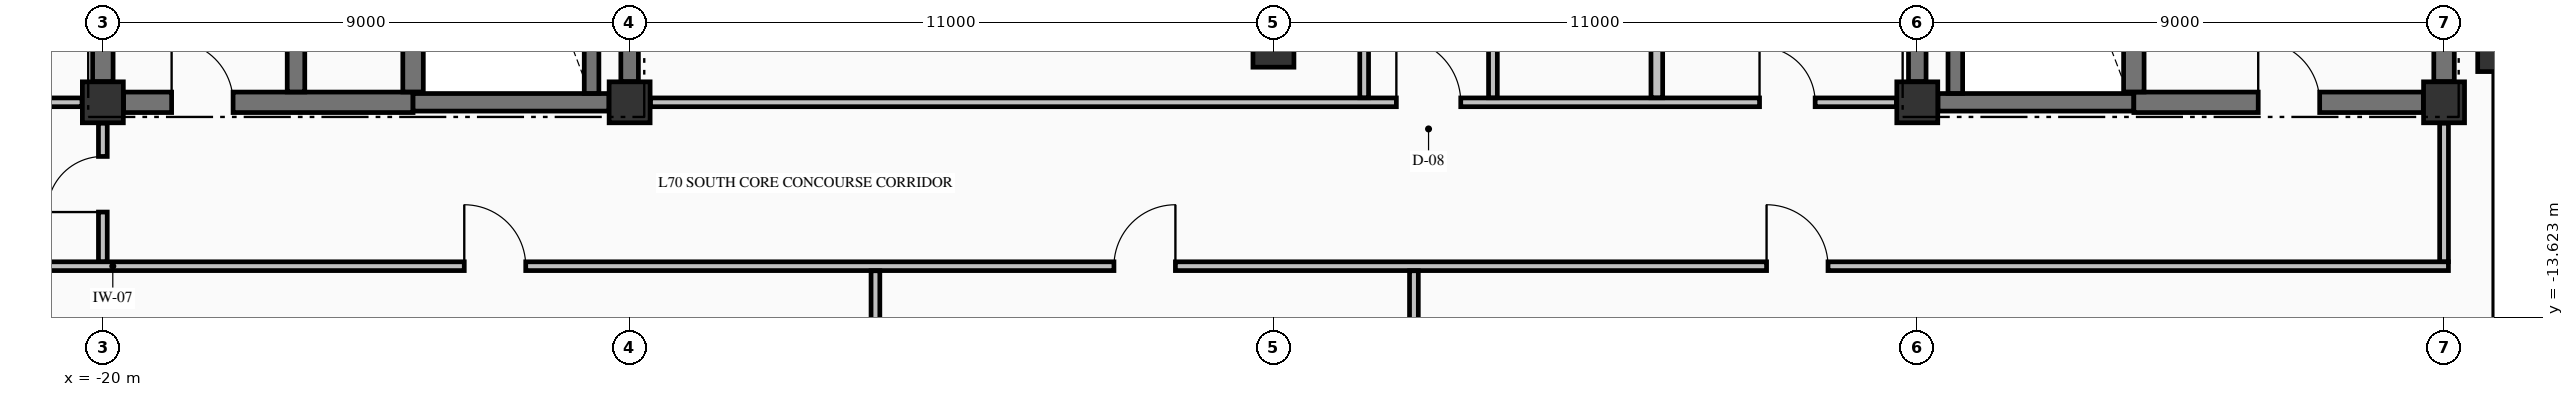
"""IFC4 building model, lengths in metres.
Left out: names, types, materials, properties, quantities, classifications, styles, units other than length and angle.
Written with IfcOpenShell. Run it as: python <this file> out.ifc"""

import sys

from ifc_helpers import new_model, si_unit, direction, frame, frame_2d, origin, origin_2d, place, context, subcontext, project, spatial, rectangle, extrude, element, fill, save


model = new_model("IFC4")
c1 = context("Model", 3, precision=1e-05, world=origin(), true_north=direction((0.0, 1.0)))
c2 = subcontext(c1, "Body", "Model", "MODEL_VIEW")
j1 = project(units=[si_unit("LENGTHUNIT", "METRE"), si_unit("PLANEANGLEUNIT", "RADIAN")], contexts=[c1])
p1 = place(None, origin())
s1 = spatial("IfcSite", under=j1, at=p1, CompositionType="ELEMENT")
p2 = place(p1, origin())
s2 = spatial("IfcBuilding", under=s1, at=p2, CompositionType="ELEMENT")
p3 = place(p2, frame((0.0, 0.0, 264.12)))
s3 = spatial("IfcBuildingStorey", under=s2, at=p3, CompositionType="ELEMENT", Elevation=264.12)
p4 = place(p3, frame((21.0, -9.0, -0.25), z_axis=(0.0, 0.0, 1.0), x_axis=(1.0, 0.0, 0.0)))
e1 = element("IfcColumn", 1, at=p4, inside=s3, PredefinedType="COLUMN", context=c2, shape_type="SweptSolid", body=[
    extrude(rectangle(XDim=0.85, YDim=0.85, at=origin_2d()), origin(), (0.0, 0.0, 1.0), 3.23),
])
for number, where, z_axis, x_axis in (
    (2, (-20.0, -9.95, -0.25), (0.0, 0.0, 1.0), (1.0, 0.0, 0.0)),
    (3, (-11.0, -9.95, -0.25), (0.0, 0.0, 1.0), (1.0, 0.0, 0.0)),
    (4, (11.0, -9.95, -0.25), (0.0, 0.0, 1.0), (1.0, 0.0, 0.0)),
    (5, (20.0, -9.95, -0.25), (0.0, 0.0, 1.0), (1.0, 0.0, 0.0)),
    (6, (0.0, -9.0, -0.25), (0.0, 0.0, 1.0), (1.0, 0.0, 0.0)),
):
    element("IfcColumn", number, at=place(p3, frame(where, z_axis=z_axis, x_axis=x_axis)), inside=s3, PredefinedType="COLUMN", context=c2, shape_type="SweptSolid", body=[
        extrude(rectangle(XDim=0.7, YDim=0.7, at=origin_2d()), origin(), (0.0, 0.0, 1.0), 3.23),
    ])
p5 = place(p3, frame((21.0, -17.545, 0.0), z_axis=(0.0, 0.0, 1.0), x_axis=(0.0, 1.0, 0.0)))
e7 = element("IfcWall", 7, at=p5, inside=s3, PredefinedType="STANDARD", context=c2, shape_type="SweptSolid", body=[
    extrude(rectangle(XDim=8.09, YDim=0.3, at=frame_2d((4.045, 0.0))), origin(), (0.0, 0.0, 1.0), 2.372),
])
p6 = place(p3, frame((-19.646, -9.95, 0.0), z_axis=(0.0, 0.0, 1.0), x_axis=(1.0, 0.0, 0.0)))
e8 = element("IfcWall", 8, at=p6, inside=s3, PredefinedType="SHEAR", context=c2, shape_type="SweptSolid", body=[
    extrude(rectangle(XDim=4.946, YDim=0.35, at=frame_2d((2.473, 0.0))), origin(), (0.0, 0.0, 1.0), 2.98),
])
p7 = place(p6, frame((0.821, 0.0, 0.0)))
e9 = element("IfcOpeningElement", 9, at=p7, cuts=e8, PredefinedType="OPENING", context=c2, shape_type="SweptSolid", body=[
    extrude(rectangle(XDim=1.05, YDim=2.15, at=frame_2d((0.525, 1.075))), frame((0.0, 0.185, 0.0), z_axis=(0.0, -1.0, 0.0), x_axis=(1.0, 0.0, 0.0)), (0.0, 0.0, 1.0), 0.37),
])
for number, where, z_axis, x_axis in (
    (10, (-14.7, -9.95, 0.0), (0.0, 0.0, 1.0), (1.0, 0.0, 0.0)),
    (11, (11.354, -9.95, 0.0), (0.0, 0.0, 1.0), (1.0, 0.0, 0.0)),
):
    element("IfcWall", number, at=place(p3, frame(where, z_axis=z_axis, x_axis=x_axis)), inside=s3, PredefinedType="SHEAR", context=c2, shape_type="SweptSolid", body=[
        extrude(rectangle(XDim=3.346, YDim=0.3, at=frame_2d((1.673, 0.0))), origin(), (0.0, 0.0, 1.0), 2.98),
    ])
p8 = place(p3, frame((14.7, -9.95, 0.0), z_axis=(0.0, 0.0, 1.0), x_axis=(1.0, 0.0, 0.0)))
e12 = element("IfcWall", 12, at=p8, inside=s3, PredefinedType="SHEAR", context=c2, shape_type="SweptSolid", body=[
    extrude(rectangle(XDim=4.946, YDim=0.35, at=frame_2d((2.473, 0.0))), origin(), (0.0, 0.0, 1.0), 2.98),
])
p9 = place(p8, frame((2.125, 0.0, 0.0)))
e13 = element("IfcOpeningElement", 13, at=p9, cuts=e12, PredefinedType="OPENING", context=c2, shape_type="SweptSolid", body=[
    extrude(rectangle(XDim=1.05, YDim=2.15, at=frame_2d((0.525, 1.075))), frame((0.0, 0.185, 0.0), z_axis=(0.0, -1.0, 0.0), x_axis=(1.0, 0.0, 0.0)), (0.0, 0.0, 1.0), 0.37),
])
p10 = place(p3, frame((-25.835, -12.75, 0.0), z_axis=(0.0, 0.0, 1.0), x_axis=(1.0, 0.0, 0.0)))
e14 = element("IfcWall", 14, at=p10, inside=s3, PredefinedType="PARTITIONING", context=c2, shape_type="SweptSolid", body=[
    extrude(rectangle(XDim=45.91, YDim=0.15, at=frame_2d((22.955, 0.0))), origin(), (0.0, 0.0, 1.0), 2.98),
])
p11 = place(p10, frame((12.01, 0.0, 0.0)))
e15 = element("IfcOpeningElement", 15, at=p11, cuts=e14, PredefinedType="OPENING", context=c2, shape_type="SweptSolid", body=[
    extrude(rectangle(XDim=1.05, YDim=2.15, at=frame_2d((0.525, 1.075))), frame((0.0, 0.085, 0.0), z_axis=(0.0, -1.0, 0.0), x_axis=(1.0, 0.0, 0.0)), (0.0, 0.0, 1.0), 0.17),
])
p12 = place(p10, frame((23.11, 0.0, 0.0)))
e16 = element("IfcOpeningElement", 16, at=p12, cuts=e14, PredefinedType="OPENING", context=c2, shape_type="SweptSolid", body=[
    extrude(rectangle(XDim=1.05, YDim=2.15, at=frame_2d((0.525, 1.075))), frame((0.0, 0.085, 0.0), z_axis=(0.0, -1.0, 0.0), x_axis=(1.0, 0.0, 0.0)), (0.0, 0.0, 1.0), 0.17),
])
p13 = place(p10, frame((34.26, 0.0, 0.0)))
e17 = element("IfcOpeningElement", 17, at=p13, cuts=e14, PredefinedType="OPENING", context=c2, shape_type="SweptSolid", body=[
    extrude(rectangle(XDim=1.05, YDim=2.15, at=frame_2d((0.525, 1.075))), frame((0.0, 0.085, 0.0), z_axis=(0.0, -1.0, 0.0), x_axis=(1.0, 0.0, 0.0)), (0.0, 0.0, 1.0), 0.17),
])
p14 = place(p3, frame((-25.835, -9.95, 0.0), z_axis=(0.0, 0.0, 1.0), x_axis=(1.0, 0.0, 0.0)))
e18 = element("IfcWall", 18, at=p14, inside=s3, PredefinedType="PARTITIONING", context=c2, shape_type="SweptSolid", body=[
    extrude(rectangle(XDim=5.479, YDim=0.15, at=frame_2d((2.74, 0.0))), origin(), (0.0, 0.0, 1.0), 2.98),
])
p15 = place(p14, frame((2.36, 0.0, 0.0)))
e19 = element("IfcOpeningElement", 19, at=p15, cuts=e18, PredefinedType="OPENING", context=c2, shape_type="SweptSolid", body=[
    extrude(rectangle(XDim=0.95, YDim=2.15, at=frame_2d((0.475, 1.075))), frame((0.0, 0.085, 0.0), z_axis=(0.0, -1.0, 0.0), x_axis=(1.0, 0.0, 0.0)), (0.0, 0.0, 1.0), 0.17),
])
p16 = place(p3, frame((-10.644, -9.95, 0.0), z_axis=(0.0, 0.0, 1.0), x_axis=(1.0, 0.0, 0.0)))
e20 = element("IfcWall", 20, at=p16, inside=s3, PredefinedType="PARTITIONING", context=c2, shape_type="SweptSolid", body=[
    extrude(rectangle(XDim=21.288, YDim=0.15, at=frame_2d((10.644, 0.0))), origin(), (0.0, 0.0, 1.0), 2.98),
])
p17 = place(p16, frame((12.744, 0.0, 0.0)))
e21 = element("IfcOpeningElement", 21, at=p17, cuts=e20, PredefinedType="OPENING", context=c2, shape_type="SweptSolid", body=[
    extrude(rectangle(XDim=1.1, YDim=2.15, at=frame_2d((0.55, 1.075))), frame((0.0, 0.085, 0.0), z_axis=(0.0, -1.0, 0.0), x_axis=(1.0, 0.0, 0.0)), (0.0, 0.0, 1.0), 0.17),
])
p18 = place(p16, frame((18.949, 0.0, 0.0)))
e22 = element("IfcOpeningElement", 22, at=p18, cuts=e20, PredefinedType="OPENING", context=c2, shape_type="SweptSolid", body=[
    extrude(rectangle(XDim=0.95, YDim=2.15, at=frame_2d((0.475, 1.075))), frame((0.0, 0.085, 0.0), z_axis=(0.0, -1.0, 0.0), x_axis=(1.0, 0.0, 0.0)), (0.0, 0.0, 1.0), 0.17),
])
p19 = place(p3, frame((-20.0, -9.596, 0.0), z_axis=(0.0, 0.0, 1.0), x_axis=(0.0, 1.0, 0.0)))
e23 = element("IfcWall", 23, at=p19, inside=s3, PredefinedType="SHEAR", context=c2, shape_type="SweptSolid", body=[
    extrude(rectangle(XDim=9.242, YDim=0.35, at=frame_2d((4.621, 0.0))), origin(), (0.0, 0.0, 1.0), 2.98),
])
p20 = place(p3, frame((-16.7, -9.773, 0.0), z_axis=(0.0, 0.0, 1.0), x_axis=(0.0, 1.0, 0.0)))
e24 = element("IfcWall", 24, at=p20, inside=s3, PredefinedType="SHEAR", context=c2, shape_type="SweptSolid", body=[
    extrude(rectangle(XDim=9.371, YDim=0.3, at=frame_2d((4.686, 0.0))), origin(), (0.0, 0.0, 1.0), 2.98),
])
p21 = place(p3, frame((-14.7, -9.773, 0.0), z_axis=(0.0, 0.0, 1.0), x_axis=(0.0, 1.0, 0.0)))
e25 = element("IfcWall", 25, at=p21, inside=s3, PredefinedType="SHEAR", context=c2, shape_type="SweptSolid", body=[
    extrude(rectangle(XDim=9.371, YDim=0.35, at=frame_2d((4.686, 0.0))), origin(), (0.0, 0.0, 1.0), 2.98),
])
p22 = place(p3, frame((-11.65, -9.798, 0.0), z_axis=(0.0, 0.0, 1.0), x_axis=(0.0, 1.0, 0.0)))
e26 = element("IfcWall", 26, at=p22, inside=s3, PredefinedType="SOLIDWALL", context=c2, shape_type="SweptSolid", body=[
    extrude(rectangle(XDim=9.396, YDim=0.25, at=frame_2d((4.698, 0.0))), origin(), (0.0, 0.0, 1.0), 2.98),
])
for number, where, z_axis, x_axis in (
    (27, (-11.0, -9.596, 0.0), (0.0, 0.0, 1.0), (0.0, 1.0, 0.0)),
    (28, (11.0, -9.596, 0.0), (0.0, 0.0, 1.0), (0.0, 1.0, 0.0)),
):
    element("IfcWall", number, at=place(p3, frame(where, z_axis=z_axis, x_axis=x_axis)), inside=s3, PredefinedType="SHEAR", context=c2, shape_type="SweptSolid", body=[
        extrude(rectangle(XDim=9.242, YDim=0.3, at=frame_2d((4.621, 0.0))), origin(), (0.0, 0.0, 1.0), 2.98),
    ])
p23 = place(p3, frame((11.65, -9.798, 0.0), z_axis=(0.0, 0.0, 1.0), x_axis=(0.0, 1.0, 0.0)))
e29 = element("IfcWall", 29, at=p23, inside=s3, PredefinedType="SOLIDWALL", context=c2, shape_type="SweptSolid", body=[
    extrude(rectangle(XDim=9.396, YDim=0.25, at=frame_2d((4.698, 0.0))), origin(), (0.0, 0.0, 1.0), 2.98),
])
p24 = place(p3, frame((14.7, -9.773, 0.0), z_axis=(0.0, 0.0, 1.0), x_axis=(0.0, 1.0, 0.0)))
e30 = element("IfcWall", 30, at=p24, inside=s3, PredefinedType="SHEAR", context=c2, shape_type="SweptSolid", body=[
    extrude(rectangle(XDim=9.371, YDim=0.35, at=frame_2d((4.686, 0.0))), origin(), (0.0, 0.0, 1.0), 2.98),
])
p25 = place(p3, frame((20.0, -9.596, 0.0), z_axis=(0.0, 0.0, 1.0), x_axis=(0.0, 1.0, 0.0)))
e31 = element("IfcWall", 31, at=p25, inside=s3, PredefinedType="SHEAR", context=c2, shape_type="SweptSolid", body=[
    extrude(rectangle(XDim=14.769, YDim=0.35, at=frame_2d((7.385, 0.0))), origin(), (0.0, 0.0, 1.0), 2.98),
])
p26 = place(p3, frame((-20.0, -12.672, 0.0), z_axis=(0.0, 0.0, 1.0), x_axis=(0.0, 1.0, 0.0)))
e32 = element("IfcWall", 32, at=p26, inside=s3, PredefinedType="PARTITIONING", context=c2, shape_type="SweptSolid", body=[
    extrude(rectangle(XDim=2.366, YDim=0.15, at=frame_2d((1.183, 0.0))), origin(), (0.0, 0.0, 1.0), 2.98),
])
p27 = place(p26, frame((0.847, 0.0, 0.0)))
e33 = element("IfcOpeningElement", 33, at=p27, cuts=e32, PredefinedType="OPENING", context=c2, shape_type="SweptSolid", body=[
    extrude(rectangle(XDim=0.95, YDim=2.15, at=frame_2d((0.475, 1.075))), frame((0.0, 0.085, 0.0), z_axis=(0.0, -1.0, 0.0), x_axis=(1.0, 0.0, 0.0)), (0.0, 0.0, 1.0), 0.17),
])
p28 = place(p3, frame((-6.8, -23.335, 0.0), z_axis=(0.0, 0.0, 1.0), x_axis=(0.0, 1.0, 0.0)))
e34 = element("IfcWall", 34, at=p28, inside=s3, PredefinedType="PARTITIONING", context=c2, shape_type="SweptSolid", body=[
    extrude(rectangle(XDim=10.507, YDim=0.15, at=frame_2d((5.253, 0.0))), origin(), (0.0, 0.0, 1.0), 2.98),
])
p29 = place(p3, frame((1.55, -9.872, 0.0), z_axis=(0.0, 0.0, 1.0), x_axis=(0.0, 1.0, 0.0)))
e35 = element("IfcWall", 35, at=p29, inside=s3, PredefinedType="PARTITIONING", context=c2, shape_type="SweptSolid", body=[
    extrude(rectangle(XDim=9.544, YDim=0.15, at=frame_2d((4.772, 0.0))), origin(), (0.0, 0.0, 1.0), 2.98),
])
p30 = place(p3, frame((2.4, -23.335, 0.0), z_axis=(0.0, 0.0, 1.0), x_axis=(0.0, 1.0, 0.0)))
e36 = element("IfcWall", 36, at=p30, inside=s3, PredefinedType="PARTITIONING", context=c2, shape_type="SweptSolid", body=[
    extrude(rectangle(XDim=10.507, YDim=0.15, at=frame_2d((5.253, 0.0))), origin(), (0.0, 0.0, 1.0), 2.98),
])
p31 = place(p3, frame((3.75, -9.872, 0.0), z_axis=(0.0, 0.0, 1.0), x_axis=(0.0, 1.0, 0.0)))
e37 = element("IfcWall", 37, at=p31, inside=s3, PredefinedType="PARTITIONING", context=c2, shape_type="SweptSolid", body=[
    extrude(rectangle(XDim=5.519, YDim=0.15, at=frame_2d((2.76, 0.0))), origin(), (0.0, 0.0, 1.0), 2.98),
])
p32 = place(p31, frame((1.997, 0.0, 0.0)))
e38 = element("IfcOpeningElement", 38, at=p32, cuts=e37, PredefinedType="OPENING", context=c2, shape_type="SweptSolid", body=[
    extrude(rectangle(XDim=0.95, YDim=2.15, at=frame_2d((0.475, 1.075))), frame((0.0, 0.085, 0.0), z_axis=(0.0, -1.0, 0.0), x_axis=(1.0, 0.0, 0.0)), (0.0, 0.0, 1.0), 0.17),
])
p33 = place(p3, frame((6.55, -9.872, 0.0), z_axis=(0.0, 0.0, 1.0), x_axis=(0.0, 1.0, 0.0)))
e39 = element("IfcWall", 39, at=p33, inside=s3, PredefinedType="PARTITIONING", context=c2, shape_type="SweptSolid", body=[
    extrude(rectangle(XDim=5.519, YDim=0.2, at=frame_2d((2.76, 0.0))), origin(), (0.0, 0.0, 1.0), 2.98),
])
p34 = place(p3, frame((20.0, -12.672, 0.0), z_axis=(0.0, 0.0, 1.0), x_axis=(0.0, 1.0, 0.0)))
e40 = element("IfcWall", 40, at=p34, inside=s3, PredefinedType="PARTITIONING", context=c2, shape_type="SweptSolid", body=[
    extrude(rectangle(XDim=2.366, YDim=0.15, at=frame_2d((1.183, 0.0))), origin(), (0.0, 0.0, 1.0), 2.57),
])
p35 = place(p7, origin())
e41 = element("IfcDoor", 41, at=p35, inside=s3, OperationType="SINGLE_SWING_LEFT", PredefinedType="DOOR", context=c2, shape_type="SweptSolid", body=[
    extrude(rectangle(XDim=1.05, YDim=2.15, at=frame_2d((0.525, 1.075))), frame((0.0, 0.025, 0.0), z_axis=(0.0, -1.0, 0.0), x_axis=(1.0, 0.0, 0.0)), (0.0, 0.0, 1.0), 0.05),
])
fill(e9, e41)
p36 = place(p9, origin())
e42 = element("IfcDoor", 42, at=p36, inside=s3, OperationType="SINGLE_SWING_LEFT", PredefinedType="DOOR", context=c2, shape_type="SweptSolid", body=[
    extrude(rectangle(XDim=1.05, YDim=2.15, at=frame_2d((0.525, 1.075))), frame((0.0, 0.025, 0.0), z_axis=(0.0, -1.0, 0.0), x_axis=(1.0, 0.0, 0.0)), (0.0, 0.0, 1.0), 0.05),
])
fill(e13, e42)
p37 = place(p17, origin())
e43 = element("IfcDoor", 43, at=p37, inside=s3, OperationType="SINGLE_SWING_LEFT", PredefinedType="DOOR", context=c2, shape_type="SweptSolid", body=[
    extrude(rectangle(XDim=1.1, YDim=2.15, at=frame_2d((0.55, 1.075))), frame((0.0, 0.025, 0.0), z_axis=(0.0, -1.0, 0.0), x_axis=(1.0, 0.0, 0.0)), (0.0, 0.0, 1.0), 0.05),
])
fill(e21, e43)
p38 = place(p11, origin())
e44 = element("IfcDoor", 44, at=p38, inside=s3, OperationType="SINGLE_SWING_LEFT", PredefinedType="DOOR", context=c2, shape_type="SweptSolid", body=[
    extrude(rectangle(XDim=1.05, YDim=2.15, at=frame_2d((0.525, 1.075))), frame((0.0, 0.025, 0.0), z_axis=(0.0, -1.0, 0.0), x_axis=(1.0, 0.0, 0.0)), (0.0, 0.0, 1.0), 0.05),
])
fill(e15, e44)
p39 = place(p12, origin())
e45 = element("IfcDoor", 45, at=p39, inside=s3, OperationType="SINGLE_SWING_RIGHT", PredefinedType="DOOR", context=c2, shape_type="SweptSolid", body=[
    extrude(rectangle(XDim=1.05, YDim=2.15, at=frame_2d((0.525, 1.075))), frame((0.0, 0.025, 0.0), z_axis=(0.0, -1.0, 0.0), x_axis=(1.0, 0.0, 0.0)), (0.0, 0.0, 1.0), 0.05),
])
fill(e16, e45)
p40 = place(p13, origin())
e46 = element("IfcDoor", 46, at=p40, inside=s3, OperationType="SINGLE_SWING_LEFT", PredefinedType="DOOR", context=c2, shape_type="SweptSolid", body=[
    extrude(rectangle(XDim=1.05, YDim=2.15, at=frame_2d((0.525, 1.075))), frame((0.0, 0.025, 0.0), z_axis=(0.0, -1.0, 0.0), x_axis=(1.0, 0.0, 0.0)), (0.0, 0.0, 1.0), 0.05),
])
fill(e17, e46)
p41 = place(p18, origin())
e47 = element("IfcDoor", 47, at=p41, inside=s3, OperationType="SINGLE_SWING_LEFT", PredefinedType="DOOR", context=c2, shape_type="SweptSolid", body=[
    extrude(rectangle(XDim=0.95, YDim=2.15, at=frame_2d((0.475, 1.075))), frame((0.0, 0.025, 0.0), z_axis=(0.0, -1.0, 0.0), x_axis=(1.0, 0.0, 0.0)), (0.0, 0.0, 1.0), 0.05),
])
fill(e22, e47)
p42 = place(p27, origin())
e48 = element("IfcDoor", 48, at=p42, inside=s3, OperationType="SINGLE_SWING_LEFT", PredefinedType="DOOR", context=c2, shape_type="SweptSolid", body=[
    extrude(rectangle(XDim=0.95, YDim=2.15, at=frame_2d((0.475, 1.075))), frame((0.0, 0.025, 0.0), z_axis=(0.0, -1.0, 0.0), x_axis=(1.0, 0.0, 0.0)), (0.0, 0.0, 1.0), 0.05),
])
fill(e33, e48)
save(model, sys.argv[1])
